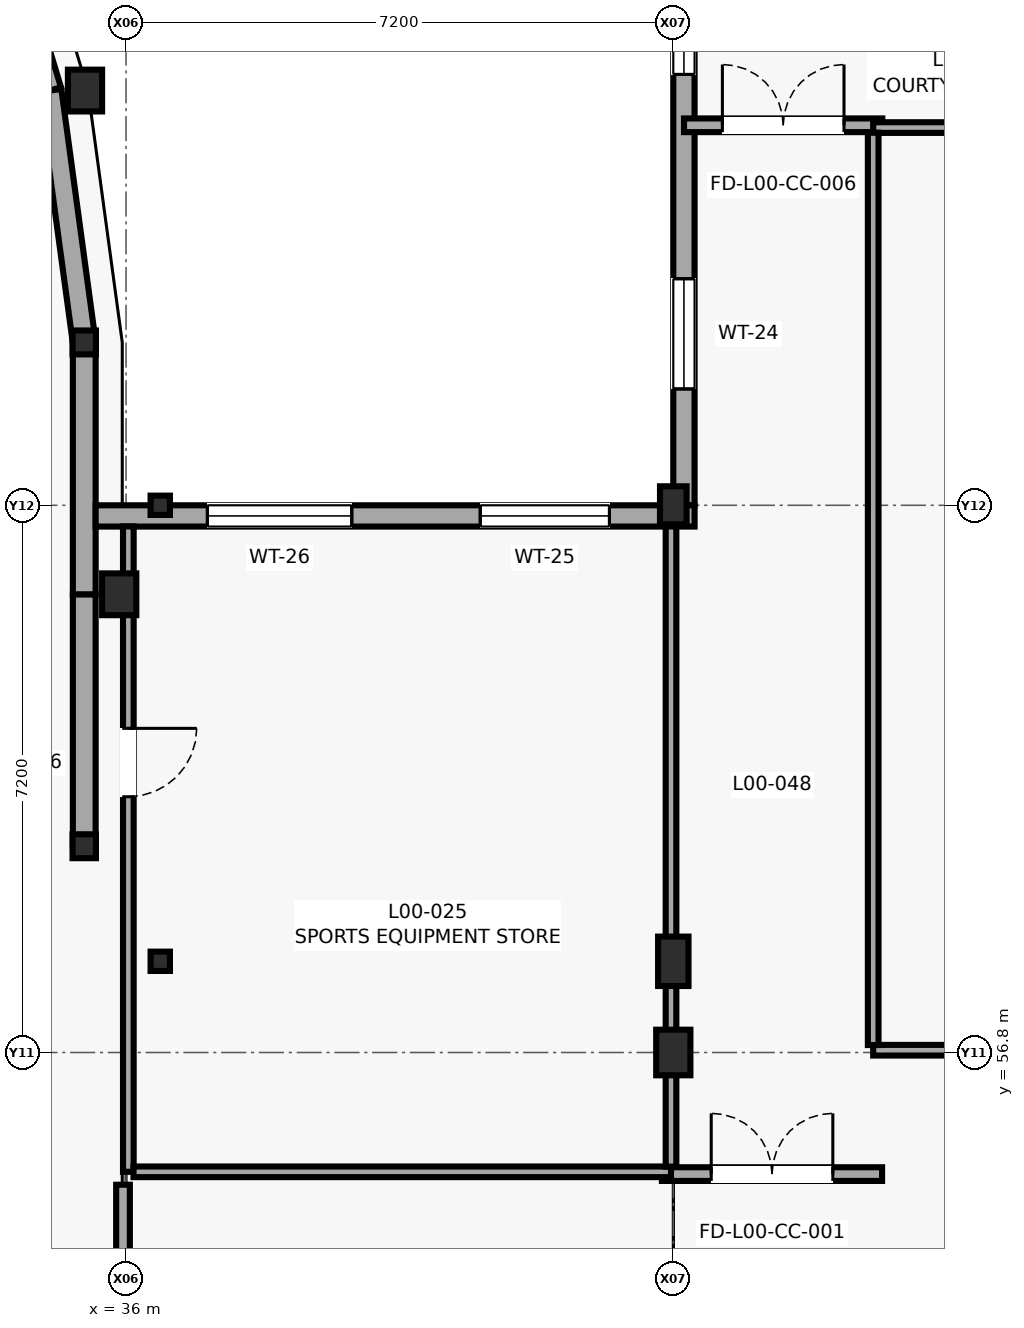
"""IFC4 building model, lengths in metres.
Left out: names, types, materials, properties, quantities, classifications, styles, units other than length and angle.
Written with IfcOpenShell. Run it as: python <this file> out.ifc"""

import sys

from ifc_helpers import new_model, si_unit, direction, frame, frame_2d, origin, origin_2d, place, context, subcontext, project, spatial, rectangle, i_section, extrude, element, fill, save


model = new_model("IFC4")
c1 = context("Model", 3, precision=1e-05, world=origin(), true_north=direction((0.0, 1.0)))
c2 = subcontext(c1, "Body", "Model", "MODEL_VIEW")
j1 = project(units=[si_unit("LENGTHUNIT", "METRE"), si_unit("PLANEANGLEUNIT", "RADIAN")], contexts=[c1])
p1 = place(None, origin())
s1 = spatial("IfcSite", under=j1, at=p1, CompositionType="ELEMENT")
p2 = place(p1, origin())
s2 = spatial("IfcBuilding", under=s1, at=p2, CompositionType="ELEMENT")
p3 = place(p2, origin())
s3 = spatial("IfcBuildingStorey", under=s2, at=p3, CompositionType="ELEMENT", Elevation=0.0)
for number, where, z_axis, x_axis in (
    (1, (35.45, 59.514, 0.0), (0.0, 0.0, 1.0), (1.0, 0.0, 0.0)),
    (2, (35.45, 66.143, 0.0), (0.0, 0.0, 1.0), (1.0, 0.0, 0.0)),
):
    element("IfcColumn", number, at=place(p3, frame(where, z_axis=z_axis, x_axis=x_axis)), inside=s3, PredefinedType="COLUMN", context=c2, shape_type="SweptSolid", body=[
        extrude(i_section(OverallWidth=0.307, OverallDepth=0.314, WebThickness=0.012, FlangeThickness=0.019, FilletRadius=0.015, at=origin_2d()), origin(), (0.0, 0.0, 1.0), 4.2),
    ])
for number, where, z_axis, x_axis in (
    (3, (35.46, 69.457, 0.0), (0.0, 0.0, 1.0), (1.0, 0.0, 0.0)),
    (4, (35.91, 62.829, 0.0), (0.0, 0.0, 1.0), (1.0, 0.0, 0.0)),
):
    element("IfcColumn", number, at=place(p3, frame(where, z_axis=z_axis, x_axis=x_axis)), inside=s3, PredefinedType="PILASTER", context=c2, shape_type="SweptSolid", body=[
        extrude(rectangle(XDim=0.45, YDim=0.55, at=origin_2d()), origin(), (0.0, 0.0, 1.0), 4.2),
    ])
for number, where, z_axis, x_axis in (
    (5, (36.45, 58.0, 0.0), (0.0, 0.0, 1.0), (1.0, 0.0, 0.0)),
    (6, (36.45, 64.0, 0.0), (0.0, 0.0, 1.0), (1.0, 0.0, 0.0)),
):
    element("IfcColumn", number, at=place(p3, frame(where, z_axis=z_axis, x_axis=x_axis)), inside=s3, PredefinedType="COLUMN", context=c2, shape_type="SweptSolid", body=[
        extrude(i_section(OverallWidth=0.255, OverallDepth=0.254, WebThickness=0.009, FlangeThickness=0.014, FilletRadius=0.013, at=origin_2d()), origin(), (0.0, 0.0, 1.0), 4.2),
    ])
p4 = place(p3, frame((43.2, 56.8, 0.0), z_axis=(0.0, 0.0, 1.0), x_axis=(1.0, 0.0, 0.0)))
e7 = element("IfcColumn", 7, at=p4, inside=s3, PredefinedType="COLUMN", context=c2, shape_type="SweptSolid", body=[
    extrude(rectangle(XDim=0.45, YDim=0.6, at=origin_2d()), origin(), (0.0, 0.0, 1.0), 4.2),
])
p5 = place(p3, frame((43.2, 58.0, 0.0), z_axis=(0.0, 0.0, 1.0), x_axis=(1.0, 0.0, 0.0)))
e8 = element("IfcColumn", 8, at=p5, inside=s3, PredefinedType="COLUMN", context=c2, shape_type="SweptSolid", body=[
    extrude(rectangle(XDim=0.4, YDim=0.65, at=origin_2d()), origin(), (0.0, 0.0, 1.0), 4.2),
])
p6 = place(p3, frame((43.2, 64.0, 0.0), z_axis=(0.0, 0.0, 1.0), x_axis=(1.0, 0.0, 0.0)))
e9 = element("IfcColumn", 9, at=p6, inside=s3, PredefinedType="PILASTER", context=c2, shape_type="SweptSolid", body=[
    extrude(rectangle(XDim=0.35, YDim=0.5, at=origin_2d()), origin(), (0.0, 0.0, 1.0), 4.2),
])
p7 = place(p3, frame((35.45, 59.514, 0.0), z_axis=(0.0, 0.0, 1.0), x_axis=(0.0, 1.0, 0.0)))
e10 = element("IfcWall", 10, at=p7, inside=s3, PredefinedType="SOLIDWALL", context=c2, shape_type="SweptSolid", body=[
    extrude(rectangle(XDim=3.315, YDim=0.3, at=frame_2d((1.658, 0.0))), origin(), (0.0, 0.0, 1.0), 3.68),
])
p8 = place(p3, frame((35.45, 62.829, 0.0), z_axis=(0.0, 0.0, 1.0), x_axis=(0.0, 1.0, 0.0)))
e11 = element("IfcWall", 11, at=p8, inside=s3, PredefinedType="SOLIDWALL", context=c2, shape_type="SweptSolid", body=[
    extrude(rectangle(XDim=3.314, YDim=0.3, at=frame_2d((1.657, 0.0))), origin(), (0.0, 0.0, 1.0), 3.68),
])
p9 = place(p3, frame((35.45, 66.143, 0.0), z_axis=(0.0, 0.0, 1.0), x_axis=(-0.134539839792, 0.990908185206, 0.0)))
e12 = element("IfcWall", 12, at=p9, inside=s3, PredefinedType="SOLIDWALL", context=c2, shape_type="SweptSolid", body=[
    extrude(rectangle(XDim=3.344, YDim=0.3, at=frame_2d((1.672, 0.0))), origin(), (0.0, 0.0, 1.0), 3.68),
])
p10 = place(p3, frame((35.0, 69.457, 0.0), z_axis=(0.0, 0.0, 1.0), x_axis=(-0.288887509039, 0.957363048755, 0.0)))
e13 = element("IfcWall", 13, at=p10, inside=s3, PredefinedType="SOLIDWALL", context=c2, shape_type="SweptSolid", body=[
    extrude(rectangle(XDim=3.462, YDim=0.3, at=frame_2d((1.731, 0.0))), origin(), (0.0, 0.0, 1.0), 3.68),
])
p11 = place(p3, frame((43.34, 77.538, 0.0), z_axis=(0.0, 0.0, 1.0), x_axis=(0.0, -1.0, 0.0)))
e14 = element("IfcWall", 14, at=p11, inside=s3, PredefinedType="SOLIDWALL", context=c2, shape_type="SweptSolid", body=[
    extrude(rectangle(XDim=13.538, YDim=0.28, at=frame_2d((6.769, 0.0))), origin(), (0.0, 0.0, 1.0), 3.425),
])
p12 = place(p11, frame((0.831, 0.0, 1.05)))
e15 = element("IfcOpeningElement", 15, at=p12, cuts=e14, PredefinedType="OPENING", context=c2, shape_type="SweptSolid", body=[
    extrude(rectangle(XDim=1.95, YDim=1.5, at=frame_2d((0.975, 0.75))), frame((0.0, 0.15, 0.0), z_axis=(0.0, -1.0, 0.0), x_axis=(1.0, 0.0, 0.0)), (0.0, 0.0, 1.0), 0.3),
])
p13 = place(p11, frame((6.569, 0.0, 1.05)))
e16 = element("IfcOpeningElement", 16, at=p13, cuts=e14, PredefinedType="OPENING", context=c2, shape_type="SweptSolid", body=[
    extrude(rectangle(XDim=1.3, YDim=1.6, at=frame_2d((0.65, 0.8))), frame((0.0, 0.15, 0.0), z_axis=(0.0, -1.0, 0.0), x_axis=(1.0, 0.0, 0.0)), (0.0, 0.0, 1.0), 0.3),
])
p14 = place(p11, frame((10.557, 0.0, 0.85)))
e17 = element("IfcOpeningElement", 17, at=p14, cuts=e14, PredefinedType="OPENING", context=c2, shape_type="SweptSolid", body=[
    extrude(rectangle(XDim=1.45, YDim=1.7, at=frame_2d((0.725, 0.85))), frame((0.0, 0.15, 0.0), z_axis=(0.0, -1.0, 0.0), x_axis=(1.0, 0.0, 0.0)), (0.0, 0.0, 1.0), 0.3),
])
p15 = place(p3, frame((43.48, 63.86, 0.0), z_axis=(0.0, 0.0, 1.0), x_axis=(-1.0, 0.0, 0.0)))
e18 = element("IfcWall", 18, at=p15, inside=s3, PredefinedType="SOLIDWALL", context=c2, shape_type="SweptSolid", body=[
    extrude(rectangle(XDim=7.88, YDim=0.28, at=frame_2d((3.94, 0.0))), origin(), (0.0, 0.0, 1.0), 3.075),
])
p16 = place(p15, frame((1.12, 0.0, 0.85)))
e19 = element("IfcOpeningElement", 19, at=p16, cuts=e18, PredefinedType="OPENING", context=c2, shape_type="SweptSolid", body=[
    extrude(rectangle(XDim=1.7, YDim=1.75, at=frame_2d((0.85, 0.875))), frame((0.0, 0.15, 0.0), z_axis=(0.0, -1.0, 0.0), x_axis=(1.0, 0.0, 0.0)), (0.0, 0.0, 1.0), 0.3),
])
p17 = place(p15, frame((4.51, 0.0, 0.85)))
e20 = element("IfcOpeningElement", 20, at=p17, cuts=e18, PredefinedType="OPENING", context=c2, shape_type="SweptSolid", body=[
    extrude(rectangle(XDim=1.9, YDim=1.65, at=frame_2d((0.95, 0.825))), frame((0.0, 0.15, 0.0), z_axis=(0.0, -1.0, 0.0), x_axis=(1.0, 0.0, 0.0)), (0.0, 0.0, 1.0), 0.3),
])
p18 = place(p3, frame((35.96, 50.678, 0.0), z_axis=(0.0, 0.0, 1.0), x_axis=(0.0, 1.0, 0.0)))
e21 = element("IfcWall", 21, at=p18, inside=s3, PredefinedType="PARTITIONING", context=c2, shape_type="SweptSolid", body=[
    extrude(rectangle(XDim=4.382, YDim=0.18, at=frame_2d((2.191, 0.0))), origin(), (0.0, 0.0, 1.0), 3.98),
])
p19 = place(p18, frame((0.9, 0.0, 0.0)))
e22 = element("IfcOpeningElement", 22, at=p19, cuts=e21, PredefinedType="OPENING", context=c2, shape_type="SweptSolid", body=[
    extrude(rectangle(XDim=1.6, YDim=2.25, at=frame_2d((0.8, 1.125))), frame((0.0, 0.1, 0.0), z_axis=(0.0, -1.0, 0.0), x_axis=(1.0, 0.0, 0.0)), (0.0, 0.0, 1.0), 0.2),
])
p20 = place(p3, frame((43.05, 55.2, 0.0), z_axis=(0.0, 0.0, 1.0), x_axis=(1.0, 0.0, 0.0)))
e23 = element("IfcWall", 23, at=p20, inside=s3, PredefinedType="PARTITIONING", context=c2, shape_type="SweptSolid", body=[
    extrude(rectangle(XDim=2.897, YDim=0.18, at=frame_2d((1.448, 0.0))), origin(), (0.0, 0.0, 1.0), 3.98),
])
p21 = place(p20, frame((0.649, 0.0, 0.0)))
e24 = element("IfcOpeningElement", 24, at=p21, cuts=e23, PredefinedType="OPENING", context=c2, shape_type="SweptSolid", body=[
    extrude(rectangle(XDim=1.6, YDim=2.25, at=frame_2d((0.8, 1.125))), frame((0.0, 0.1, 0.0), z_axis=(0.0, -1.0, 0.0), x_axis=(1.0, 0.0, 0.0)), (0.0, 0.0, 1.0), 0.2),
])
p22 = place(p3, frame((43.341, 69.0, 0.0), z_axis=(0.0, 0.0, 1.0), x_axis=(1.0, 0.0, 0.0)))
e25 = element("IfcWall", 25, at=p22, inside=s3, PredefinedType="PARTITIONING", context=c2, shape_type="SweptSolid", body=[
    extrude(rectangle(XDim=2.609, YDim=0.18, at=frame_2d((1.304, 0.0))), origin(), (0.0, 0.0, 1.0), 3.98),
])
p23 = place(p22, frame((0.505, 0.0, 0.0)))
e26 = element("IfcOpeningElement", 26, at=p23, cuts=e25, PredefinedType="OPENING", context=c2, shape_type="SweptSolid", body=[
    extrude(rectangle(XDim=1.6, YDim=2.25, at=frame_2d((0.8, 1.125))), frame((0.0, 0.1, 0.0), z_axis=(0.0, -1.0, 0.0), x_axis=(1.0, 0.0, 0.0)), (0.0, 0.0, 1.0), 0.2),
])
p24 = place(p3, frame((36.03, 63.722, 0.0), z_axis=(0.0, 0.0, 1.0), x_axis=(0.0, -1.0, 0.0)))
e27 = element("IfcWall", 27, at=p24, inside=s3, PredefinedType="PARTITIONING", context=c2, shape_type="SweptSolid", body=[
    extrude(rectangle(XDim=8.492, YDim=0.14, at=frame_2d((4.246, 0.0))), origin(), (0.0, 0.0, 1.0), 3.975),
])
p25 = place(p24, frame((2.657, 0.0, 0.0)))
e28 = element("IfcOpeningElement", 28, at=p25, cuts=e27, PredefinedType="OPENING", context=c2, shape_type="SweptSolid", body=[
    extrude(rectangle(XDim=0.9, YDim=2.02, at=frame_2d((0.45, 1.01))), frame((0.0, 0.08, 0.0), z_axis=(0.0, -1.0, 0.0), x_axis=(1.0, 0.0, 0.0)), (0.0, 0.0, 1.0), 0.16),
])
p26 = place(p3, frame((36.098, 55.23, 0.0), z_axis=(0.0, 0.0, 1.0), x_axis=(1.0, 0.0, 0.0)))
e29 = element("IfcWall", 29, at=p26, inside=s3, PredefinedType="PARTITIONING", context=c2, shape_type="SweptSolid", body=[
    extrude(rectangle(XDim=7.072, YDim=0.14, at=frame_2d((3.536, 0.0))), origin(), (0.0, 0.0, 1.0), 3.975),
])
p27 = place(p3, frame((43.17, 55.298, 0.0), z_axis=(0.0, 0.0, 1.0), x_axis=(0.0, 1.0, 0.0)))
e30 = element("IfcWall", 30, at=p27, inside=s3, PredefinedType="PARTITIONING", context=c2, shape_type="SweptSolid", body=[
    extrude(rectangle(XDim=8.424, YDim=0.14, at=frame_2d((4.212, 0.0))), origin(), (0.0, 0.0, 1.0), 3.375),
])
p28 = place(p3, frame((45.83, 56.83, 0.0), z_axis=(0.0, 0.0, 1.0), x_axis=(1.0, 0.0, 0.0)))
e31 = element("IfcWall", 31, at=p28, inside=s3, PredefinedType="PARTITIONING", context=c2, shape_type="SweptSolid", body=[
    extrude(rectangle(XDim=5.6, YDim=0.14, at=frame_2d((2.8, 0.0))), origin(), (0.0, 0.0, 1.0), 3.125),
])
p29 = place(p3, frame((63.37, 68.97, 0.0), z_axis=(0.0, 0.0, 1.0), x_axis=(-1.0, 0.0, 0.0)))
e32 = element("IfcWall", 32, at=p29, inside=s3, PredefinedType="PARTITIONING", context=c2, shape_type="SweptSolid", body=[
    extrude(rectangle(XDim=17.54, YDim=0.14, at=frame_2d((8.77, 0.0))), origin(), (0.0, 0.0, 1.0), 3.975),
])
p30 = place(p29, frame((7.945, 0.0, 0.0)))
e33 = element("IfcOpeningElement", 33, at=p30, cuts=e32, PredefinedType="OPENING", context=c2, shape_type="SweptSolid", body=[
    extrude(rectangle(XDim=1.65, YDim=2.32, at=frame_2d((0.825, 1.16))), frame((0.0, 0.08, 0.0), z_axis=(0.0, -1.0, 0.0), x_axis=(1.0, 0.0, 0.0)), (0.0, 0.0, 1.0), 0.16),
])
p31 = place(p29, frame((10.295, 0.0, 1.05)))
e34 = element("IfcOpeningElement", 34, at=p31, cuts=e32, PredefinedType="OPENING", context=c2, shape_type="SweptSolid", body=[
    extrude(rectangle(XDim=1.8, YDim=1.2, at=frame_2d((0.9, 0.6))), frame((0.0, 0.08, 0.0), z_axis=(0.0, -1.0, 0.0), x_axis=(1.0, 0.0, 0.0)), (0.0, 0.0, 1.0), 0.16),
])
p32 = place(p3, frame((45.83, 68.902, 0.0), z_axis=(0.0, 0.0, 1.0), x_axis=(0.0, -1.0, 0.0)))
e35 = element("IfcWall", 35, at=p32, inside=s3, PredefinedType="PARTITIONING", context=c2, shape_type="SweptSolid", body=[
    extrude(rectangle(XDim=12.004, YDim=0.14, at=frame_2d((6.002, 0.0))), origin(), (0.0, 0.0, 1.0), 3.975),
])
p33 = place(p13, origin())
e36 = element("IfcWindow", 36, at=p33, inside=s3, PartitioningType="SINGLE_PANEL", PredefinedType="WINDOW", context=c2, shape_type="SweptSolid", body=[
    extrude(rectangle(XDim=1.3, YDim=1.6, at=frame_2d((0.65, 0.8))), frame((0.0, 0.03, 0.0), z_axis=(0.0, -1.0, 0.0), x_axis=(1.0, 0.0, 0.0)), (0.0, 0.0, 1.0), 0.06),
])
fill(e16, e36)
p34 = place(p14, origin())
e37 = element("IfcWindow", 37, at=p34, inside=s3, PartitioningType="SINGLE_PANEL", PredefinedType="WINDOW", context=c2, shape_type="SweptSolid", body=[
    extrude(rectangle(XDim=1.45, YDim=1.7, at=frame_2d((0.725, 0.85))), frame((0.0, 0.03, 0.0), z_axis=(0.0, -1.0, 0.0), x_axis=(1.0, 0.0, 0.0)), (0.0, 0.0, 1.0), 0.06),
])
fill(e17, e37)
p35 = place(p16, origin())
e38 = element("IfcWindow", 38, at=p35, inside=s3, PartitioningType="SINGLE_PANEL", PredefinedType="WINDOW", context=c2, shape_type="SweptSolid", body=[
    extrude(rectangle(XDim=1.7, YDim=1.75, at=frame_2d((0.85, 0.875))), frame((0.0, 0.03, 0.0), z_axis=(0.0, -1.0, 0.0), x_axis=(1.0, 0.0, 0.0)), (0.0, 0.0, 1.0), 0.06),
])
fill(e19, e38)
p36 = place(p17, origin())
e39 = element("IfcWindow", 39, at=p36, inside=s3, PartitioningType="SINGLE_PANEL", PredefinedType="WINDOW", context=c2, shape_type="SweptSolid", body=[
    extrude(rectangle(XDim=1.9, YDim=1.65, at=frame_2d((0.95, 0.825))), frame((0.0, 0.03, 0.0), z_axis=(0.0, -1.0, 0.0), x_axis=(1.0, 0.0, 0.0)), (0.0, 0.0, 1.0), 0.06),
])
fill(e20, e39)
p37 = place(p21, origin())
e40 = element("IfcDoor", 40, at=p37, inside=s3, OperationType="DOUBLE_DOOR_SINGLE_SWING", PredefinedType="DOOR", context=c2, shape_type="SweptSolid", body=[
    extrude(rectangle(XDim=1.6, YDim=2.25, at=frame_2d((0.8, 1.125))), frame((0.0, 0.025, 0.0), z_axis=(0.0, -1.0, 0.0), x_axis=(1.0, 0.0, 0.0)), (0.0, 0.0, 1.0), 0.05),
])
fill(e24, e40)
p38 = place(p23, origin())
e41 = element("IfcDoor", 41, at=p38, inside=s3, OperationType="DOUBLE_DOOR_SINGLE_SWING", PredefinedType="DOOR", context=c2, shape_type="SweptSolid", body=[
    extrude(rectangle(XDim=1.6, YDim=2.25, at=frame_2d((0.8, 1.125))), frame((0.0, 0.025, 0.0), z_axis=(0.0, -1.0, 0.0), x_axis=(1.0, 0.0, 0.0)), (0.0, 0.0, 1.0), 0.05),
])
fill(e26, e41)
p39 = place(p25, origin())
e42 = element("IfcDoor", 42, at=p39, inside=s3, OperationType="SINGLE_SWING_LEFT", PredefinedType="DOOR", context=c2, shape_type="SweptSolid", body=[
    extrude(rectangle(XDim=0.9, YDim=2.02, at=frame_2d((0.45, 1.01))), frame((0.0, 0.025, 0.0), z_axis=(0.0, -1.0, 0.0), x_axis=(1.0, 0.0, 0.0)), (0.0, 0.0, 1.0), 0.05),
])
fill(e28, e42)
save(model, sys.argv[1])
